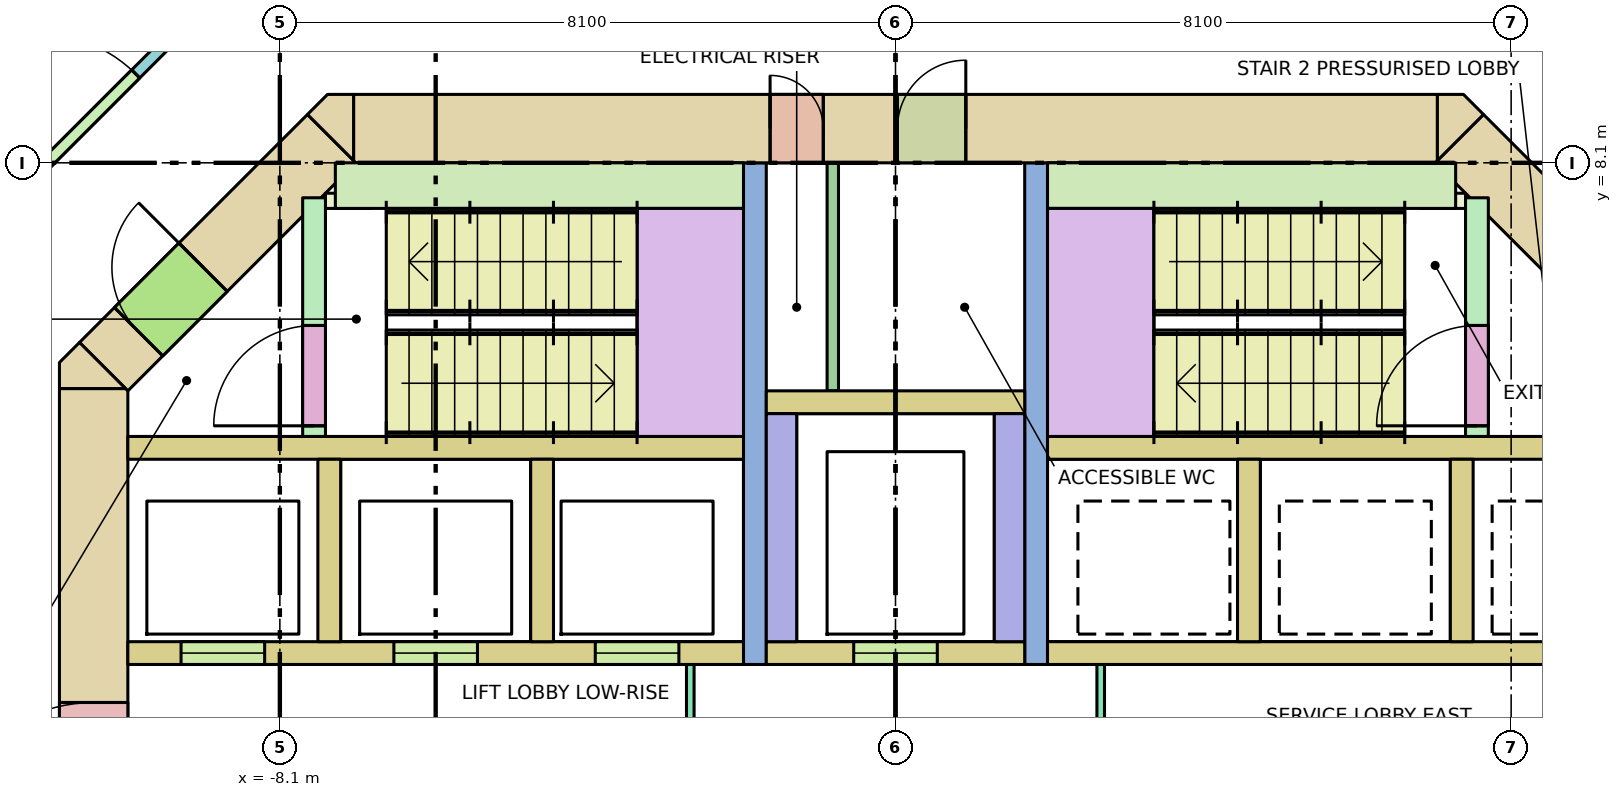
"""IFC4 building model, lengths in metres.
Left out: names, types, materials, properties, quantities, classifications, styles, units other than length and angle.
Written with IfcOpenShell. Run it as: python <this file> out.ifc"""

import sys

from ifc_helpers import new_model, si_unit, direction, frame, frame_2d, origin, place, context, subcontext, project, spatial, polyline, rectangle, outline, extrude, element, fill, save


model = new_model("IFC4")
c1 = context("Model", 3, precision=1e-05, world=origin(), true_north=direction((0.0, 1.0)))
c2 = subcontext(c1, "Body", "Model", "MODEL_VIEW")
j1 = project(units=[si_unit("LENGTHUNIT", "METRE"), si_unit("PLANEANGLEUNIT", "RADIAN")], contexts=[c1])
p1 = place(None, origin())
s1 = spatial("IfcSite", under=j1, at=p1, CompositionType="ELEMENT")
p2 = place(p1, origin())
s2 = spatial("IfcBuilding", under=s1, at=p2, CompositionType="ELEMENT")
p3 = place(p2, frame((0.0, 0.0, 98.6)))
s3 = spatial("IfcBuildingStorey", under=s2, at=p3, CompositionType="ELEMENT", Elevation=98.6)
p4 = place(p3, frame((-7.13, 8.55, -0.28), z_axis=(0.0, 0.0, 1.0), x_axis=(1.0, 0.0, 0.0)))
e1 = element("IfcWall", 1, at=p4, inside=s3, PredefinedType="SHEAR", context=c2, shape_type="SweptSolid", body=[
    extrude(rectangle(XDim=14.26, YDim=0.9, at=frame_2d((7.13, 0.0))), origin(), (0.0, 0.0, 1.0), 4.0),
])
p5 = place(p4, frame((5.48, 0.0, 0.28)))
e2 = element("IfcOpeningElement", 2, at=p5, cuts=e1, PredefinedType="OPENING", context=c2, shape_type="SweptSolid", body=[
    extrude(rectangle(XDim=0.7, YDim=2.1, at=frame_2d((0.35, 1.05))), frame((0.0, 0.46, 0.0), z_axis=(0.0, -1.0, 0.0), x_axis=(1.0, 0.0, 0.0)), (0.0, 0.0, 1.0), 0.92),
])
p6 = place(p4, frame((7.155, 0.0, 0.28)))
e3 = element("IfcOpeningElement", 3, at=p6, cuts=e1, PredefinedType="OPENING", context=c2, shape_type="SweptSolid", body=[
    extrude(rectangle(XDim=0.9, YDim=2.1, at=frame_2d((0.45, 1.05))), frame((0.0, 0.46, 0.0), z_axis=(0.0, -1.0, 0.0), x_axis=(1.0, 0.0, 0.0)), (0.0, 0.0, 1.0), 0.92),
])
p7 = place(p3, frame((-10.55, -5.13, -0.28), z_axis=(0.0, 0.0, 1.0), x_axis=(0.0, 1.0, 0.0)))
e4 = element("IfcWall", 4, at=p7, inside=s3, PredefinedType="SHEAR", context=c2, shape_type="SweptSolid", body=[
    extrude(rectangle(XDim=10.26, YDim=0.9, at=frame_2d((5.13, 0.0))), origin(), (0.0, 0.0, 1.0), 4.0),
])
p8 = place(p7, frame((4.13, 0.0, 0.28)))
e5 = element("IfcOpeningElement", 5, at=p8, cuts=e4, PredefinedType="OPENING", context=c2, shape_type="SweptSolid", body=[
    extrude(rectangle(XDim=2.0, YDim=2.1, at=frame_2d((1.0, 1.05))), frame((0.0, 0.46, 0.0), z_axis=(0.0, -1.0, 0.0), x_axis=(1.0, 0.0, 0.0)), (0.0, 0.0, 1.0), 0.92),
])
p9 = place(p3, frame((-10.418, 5.418, -0.28), z_axis=(0.0, 0.0, 1.0), x_axis=(0.707106781187, 0.707106781187, 0.0)))
e6 = element("IfcWall", 6, at=p9, inside=s3, PredefinedType="SHEAR", context=c2, shape_type="SweptSolid", body=[
    extrude(rectangle(XDim=4.243, YDim=0.9, at=frame_2d((2.121, 0.0))), origin(), (0.0, 0.0, 1.0), 4.0),
])
p10 = place(p9, frame((0.65, 0.0, 0.28)))
e7 = element("IfcOpeningElement", 7, at=p10, cuts=e6, PredefinedType="OPENING", context=c2, shape_type="SweptSolid", body=[
    extrude(rectangle(XDim=1.2, YDim=2.1, at=frame_2d((0.6, 1.05))), frame((0.0, 0.46, 0.0), z_axis=(0.0, -1.0, 0.0), x_axis=(1.0, 0.0, 0.0)), (0.0, 0.0, 1.0), 0.92),
])
p11 = place(p3, frame((7.418, 8.418, -0.28), z_axis=(0.0, 0.0, 1.0), x_axis=(0.707106781187, -0.707106781187, 0.0)))
e8 = element("IfcWall", 8, at=p11, inside=s3, PredefinedType="SHEAR", context=c2, shape_type="SweptSolid", body=[
    extrude(rectangle(XDim=4.243, YDim=0.9, at=frame_2d((2.121, 0.0))), origin(), (0.0, 0.0, 1.0), 4.0),
])
p12 = place(p11, frame((2.393, 0.0, 0.28)))
e9 = element("IfcOpeningElement", 9, at=p12, cuts=e8, PredefinedType="OPENING", context=c2, shape_type="SweptSolid", body=[
    extrude(rectangle(XDim=1.2, YDim=2.1, at=frame_2d((0.6, 1.05))), frame((0.0, 0.46, 0.0), z_axis=(0.0, -1.0, 0.0), x_axis=(1.0, 0.0, 0.0)), (0.0, 0.0, 1.0), 0.92),
])
p13 = place(p3, frame((0.0, 0.0, -0.28)))
e10 = element("IfcWall", 10, at=p13, inside=s3, PredefinedType="SHEAR", context=c2, shape_type="SweptSolid", body=[
    extrude(outline(polyline([(-10.736, 5.736), (-10.13, 5.13), (-11.0, 5.13), (-11.0, 5.473), (-10.736, 5.736)])), origin(), (0.0, 0.0, 1.0), 4.0),
])
p14 = place(p3, frame((0.0, 0.0, -0.28)))
e11 = element("IfcWall", 11, at=p14, inside=s3, PredefinedType="SHEAR", context=c2, shape_type="SweptSolid", body=[
    extrude(outline(polyline([(-7.473, 9.0), (-7.13, 9.0), (-7.13, 8.13), (-7.736, 8.736), (-7.473, 9.0)])), origin(), (0.0, 0.0, 1.0), 4.0),
])
p15 = place(p3, frame((0.0, 0.0, -0.28)))
e12 = element("IfcWall", 12, at=p15, inside=s3, PredefinedType="SHEAR", context=c2, shape_type="SweptSolid", body=[
    extrude(outline(polyline([(7.473, 9.0), (7.736, 8.736), (7.13, 8.13), (7.13, 9.0), (7.473, 9.0)])), origin(), (0.0, 0.0, 1.0), 4.0),
])
for number, where, z_axis, x_axis in (
    (13, (-10.1, 4.35, 0.0), (0.0, 0.0, 1.0), (1.0, 0.0, 0.0)),
    (14, (2.0, 4.35, 0.0), (0.0, 0.0, 1.0), (1.0, 0.0, 0.0)),
):
    element("IfcWall", number, at=place(p3, frame(where, z_axis=z_axis, x_axis=x_axis)), inside=s3, PredefinedType="SOLIDWALL", context=c2, shape_type="SweptSolid", body=[
        extrude(rectangle(XDim=8.1, YDim=0.3, at=frame_2d((4.05, 0.0))), origin(), (0.0, 0.0, 1.0), 3.72),
    ])
p16 = place(p3, frame((-10.1, 1.65, 0.0), z_axis=(0.0, 0.0, 1.0), x_axis=(1.0, 0.0, 0.0)))
e15 = element("IfcWall", 15, at=p16, inside=s3, PredefinedType="SOLIDWALL", context=c2, shape_type="SweptSolid", body=[
    extrude(rectangle(XDim=8.1, YDim=0.3, at=frame_2d((4.05, 0.0))), origin(), (0.0, 0.0, 1.0), 3.72),
])
p17 = place(p16, frame((0.7, 0.0, 0.0)))
e16 = element("IfcOpeningElement", 16, at=p17, cuts=e15, PredefinedType="OPENING", context=c2, shape_type="SweptSolid", body=[
    extrude(rectangle(XDim=1.1, YDim=2.1, at=frame_2d((0.55, 1.05))), frame((0.0, 0.16, 0.0), z_axis=(0.0, -1.0, 0.0), x_axis=(1.0, 0.0, 0.0)), (0.0, 0.0, 1.0), 0.32),
])
p18 = place(p16, frame((3.5, 0.0, 0.0)))
e17 = element("IfcOpeningElement", 17, at=p18, cuts=e15, PredefinedType="OPENING", context=c2, shape_type="SweptSolid", body=[
    extrude(rectangle(XDim=1.1, YDim=2.1, at=frame_2d((0.55, 1.05))), frame((0.0, 0.16, 0.0), z_axis=(0.0, -1.0, 0.0), x_axis=(1.0, 0.0, 0.0)), (0.0, 0.0, 1.0), 0.32),
])
p19 = place(p16, frame((6.15, 0.0, 0.0)))
e18 = element("IfcOpeningElement", 18, at=p19, cuts=e15, PredefinedType="OPENING", context=c2, shape_type="SweptSolid", body=[
    extrude(rectangle(XDim=1.1, YDim=2.1, at=frame_2d((0.55, 1.05))), frame((0.0, 0.16, 0.0), z_axis=(0.0, -1.0, 0.0), x_axis=(1.0, 0.0, 0.0)), (0.0, 0.0, 1.0), 0.32),
])
p20 = place(p3, frame((2.0, 1.65, 0.0), z_axis=(0.0, 0.0, 1.0), x_axis=(1.0, 0.0, 0.0)))
e19 = element("IfcWall", 19, at=p20, inside=s3, PredefinedType="SOLIDWALL", context=c2, shape_type="SweptSolid", body=[
    extrude(rectangle(XDim=8.1, YDim=0.3, at=frame_2d((4.05, 0.0))), origin(), (0.0, 0.0, 1.0), 3.72),
])
for number, where, z_axis, x_axis in (
    (20, (-7.45, 1.8, 0.0), (0.0, 0.0, 1.0), (0.0, 1.0, 0.0)),
    (21, (-4.65, 1.8, 0.0), (0.0, 0.0, 1.0), (0.0, 1.0, 0.0)),
    (22, (4.65, 1.8, 0.0), (0.0, 0.0, 1.0), (0.0, 1.0, 0.0)),
    (23, (7.45, 1.8, 0.0), (0.0, 0.0, 1.0), (0.0, 1.0, 0.0)),
):
    element("IfcWall", number, at=place(p3, frame(where, z_axis=z_axis, x_axis=x_axis)), inside=s3, PredefinedType="SOLIDWALL", context=c2, shape_type="SweptSolid", body=[
        extrude(rectangle(XDim=2.4, YDim=0.3, at=frame_2d((1.2, 0.0))), origin(), (0.0, 0.0, 1.0), 3.72),
    ])
for number, where, z_axis, x_axis in (
    (24, (-1.85, 1.5, 0.0), (0.0, 0.0, 1.0), (0.0, 1.0, 0.0)),
    (25, (1.85, 1.5, 0.0), (0.0, 0.0, 1.0), (0.0, 1.0, 0.0)),
):
    element("IfcWall", number, at=place(p3, frame(where, z_axis=z_axis, x_axis=x_axis)), inside=s3, PredefinedType="SHEAR", context=c2, shape_type="SweptSolid", body=[
        extrude(rectangle(XDim=6.6, YDim=0.3, at=frame_2d((3.3, 0.0))), origin(), (0.0, 0.0, 1.0), 3.72),
    ])
p21 = place(p3, frame((-1.7, 1.65, 0.0), z_axis=(0.0, 0.0, 1.0), x_axis=(1.0, 0.0, 0.0)))
e26 = element("IfcWall", 26, at=p21, inside=s3, PredefinedType="SOLIDWALL", context=c2, shape_type="SweptSolid", body=[
    extrude(rectangle(XDim=3.4, YDim=0.3, at=frame_2d((1.7, 0.0))), origin(), (0.0, 0.0, 1.0), 3.72),
])
p22 = place(p21, frame((1.15, 0.0, 0.0)))
e27 = element("IfcOpeningElement", 27, at=p22, cuts=e26, PredefinedType="OPENING", context=c2, shape_type="SweptSolid", body=[
    extrude(rectangle(XDim=1.1, YDim=2.1, at=frame_2d((0.55, 1.05))), frame((0.0, 0.16, 0.0), z_axis=(0.0, -1.0, 0.0), x_axis=(1.0, 0.0, 0.0)), (0.0, 0.0, 1.0), 0.32),
])
for number, where, z_axis, x_axis in (
    (28, (-1.5, 1.8, 0.0), (0.0, 0.0, 1.0), (0.0, 1.0, 0.0)),
    (29, (1.5, 1.8, 0.0), (0.0, 0.0, 1.0), (0.0, 1.0, 0.0)),
):
    element("IfcWall", number, at=place(p3, frame(where, z_axis=z_axis, x_axis=x_axis)), inside=s3, PredefinedType="SOLIDWALL", context=c2, shape_type="SweptSolid", body=[
        extrude(rectangle(XDim=3.0, YDim=0.4, at=frame_2d((1.5, 0.0))), origin(), (0.0, 0.0, 1.0), 3.72),
    ])
p23 = place(p3, frame((-1.7, 4.95, 0.0), z_axis=(0.0, 0.0, 1.0), x_axis=(1.0, 0.0, 0.0)))
e30 = element("IfcWall", 30, at=p23, inside=s3, PredefinedType="SOLIDWALL", context=c2, shape_type="SweptSolid", body=[
    extrude(rectangle(XDim=3.4, YDim=0.3, at=frame_2d((1.7, 0.0))), origin(), (0.0, 0.0, 1.0), 3.72),
])
p24 = place(p3, frame((-7.65, 4.5, 0.0), z_axis=(0.0, 0.0, 1.0), x_axis=(0.0, 1.0, 0.0)))
e31 = element("IfcWall", 31, at=p24, inside=s3, PredefinedType="SHEAR", context=c2, shape_type="SweptSolid", body=[
    extrude(rectangle(XDim=3.14, YDim=0.3, at=frame_2d((1.57, 0.0))), origin(), (0.0, 0.0, 1.0), 3.72),
])
p25 = place(p24, frame((0.14, 0.0, 0.0)))
e32 = element("IfcOpeningElement", 32, at=p25, cuts=e31, PredefinedType="OPENING", context=c2, shape_type="SweptSolid", body=[
    extrude(rectangle(XDim=1.32, YDim=2.1, at=frame_2d((0.66, 1.05))), frame((0.0, 0.16, 0.0), z_axis=(0.0, -1.0, 0.0), x_axis=(1.0, 0.0, 0.0)), (0.0, 0.0, 1.0), 0.32),
])
p26 = place(p3, frame((-7.37, 7.8, 0.0), z_axis=(0.0, 0.0, 1.0), x_axis=(1.0, 0.0, 0.0)))
e33 = element("IfcWall", 33, at=p26, inside=s3, PredefinedType="SHEAR", context=c2, shape_type="SweptSolid", body=[
    extrude(rectangle(XDim=5.37, YDim=0.6, at=frame_2d((2.685, 0.0))), origin(), (0.0, 0.0, 1.0), 3.72),
])
p27 = place(p3, frame((7.65, 4.5, 0.0), z_axis=(0.0, 0.0, 1.0), x_axis=(0.0, 1.0, 0.0)))
e34 = element("IfcWall", 34, at=p27, inside=s3, PredefinedType="SHEAR", context=c2, shape_type="SweptSolid", body=[
    extrude(rectangle(XDim=3.14, YDim=0.3, at=frame_2d((1.57, 0.0))), origin(), (0.0, 0.0, 1.0), 3.72),
])
p28 = place(p27, frame((0.14, 0.0, 0.0)))
e35 = element("IfcOpeningElement", 35, at=p28, cuts=e34, PredefinedType="OPENING", context=c2, shape_type="SweptSolid", body=[
    extrude(rectangle(XDim=1.32, YDim=2.1, at=frame_2d((0.66, 1.05))), frame((0.0, 0.16, 0.0), z_axis=(0.0, -1.0, 0.0), x_axis=(1.0, 0.0, 0.0)), (0.0, 0.0, 1.0), 0.32),
])
p29 = place(p3, frame((2.0, 7.8, 0.0), z_axis=(0.0, 0.0, 1.0), x_axis=(1.0, 0.0, 0.0)))
e36 = element("IfcWall", 36, at=p29, inside=s3, PredefinedType="SHEAR", context=c2, shape_type="SweptSolid", body=[
    extrude(rectangle(XDim=5.37, YDim=0.6, at=frame_2d((2.685, 0.0))), origin(), (0.0, 0.0, 1.0), 3.72),
])
for number, where, z_axis, x_axis in (
    (37, (-7.5, 7.6, 0.0), (0.0, 0.0, 1.0), (1.0, 0.0, 0.0)),
    (38, (6.9, 7.6, 0.0), (0.0, 0.0, 1.0), (1.0, 0.0, 0.0)),
):
    element("IfcWall", number, at=place(p3, frame(where, z_axis=z_axis, x_axis=x_axis)), inside=s3, PredefinedType="SHEAR", context=c2, shape_type="SweptSolid", body=[
        extrude(rectangle(XDim=0.6, YDim=0.2, at=frame_2d((0.3, 0.0))), origin(), (0.0, 0.0, 1.0), 3.72),
    ])
p30 = place(p3, frame((-2.7, -1.5, 0.0), z_axis=(0.0, 0.0, 1.0), x_axis=(0.0, 1.0, 0.0)))
e39 = element("IfcWall", 39, at=p30, inside=s3, PredefinedType="PARTITIONING", context=c2, shape_type="SweptSolid", body=[
    extrude(rectangle(XDim=3.0, YDim=0.1, at=frame_2d((1.5, 0.0))), origin(), (0.0, 0.0, 1.0), 3.72),
])
p31 = place(p30, frame((0.9, 0.0, 0.0)))
e40 = element("IfcOpeningElement", 40, at=p31, cuts=e39, PredefinedType="OPENING", context=c2, shape_type="SweptSolid", body=[
    extrude(rectangle(XDim=1.2, YDim=2.1, at=frame_2d((0.6, 1.05))), frame((0.0, 0.06, 0.0), z_axis=(0.0, -1.0, 0.0), x_axis=(1.0, 0.0, 0.0)), (0.0, 0.0, 1.0), 0.12),
])
p32 = place(p3, frame((2.7, -1.5, 0.0), z_axis=(0.0, 0.0, 1.0), x_axis=(0.0, 1.0, 0.0)))
e41 = element("IfcWall", 41, at=p32, inside=s3, PredefinedType="PARTITIONING", context=c2, shape_type="SweptSolid", body=[
    extrude(rectangle(XDim=3.0, YDim=0.1, at=frame_2d((1.5, 0.0))), origin(), (0.0, 0.0, 1.0), 3.72),
])
p33 = place(p32, frame((0.9, 0.0, 0.0)))
e42 = element("IfcOpeningElement", 42, at=p33, cuts=e41, PredefinedType="OPENING", context=c2, shape_type="SweptSolid", body=[
    extrude(rectangle(XDim=1.2, YDim=2.1, at=frame_2d((0.6, 1.05))), frame((0.0, 0.06, 0.0), z_axis=(0.0, -1.0, 0.0), x_axis=(1.0, 0.0, 0.0)), (0.0, 0.0, 1.0), 0.12),
])
p34 = place(p3, frame((-0.825, 5.1, 0.0), z_axis=(0.0, 0.0, 1.0), x_axis=(0.0, 1.0, 0.0)))
e43 = element("IfcWall", 43, at=p34, inside=s3, PredefinedType="PARTITIONING", context=c2, shape_type="SweptSolid", body=[
    extrude(rectangle(XDim=3.0, YDim=0.15, at=frame_2d((1.5, 0.0))), origin(), (0.0, 0.0, 1.0), 3.72),
])
p35 = place(p3, frame((-12.975, 6.291, 0.0), z_axis=(0.0, 0.0, 1.0), x_axis=(0.707106781187, 0.707106781187, 0.0)))
e44 = element("IfcWall", 44, at=p35, inside=s3, PredefinedType="PARTITIONING", context=c2, shape_type="SweptSolid", body=[
    extrude(rectangle(XDim=6.624, YDim=0.15, at=frame_2d((3.312, 0.0))), origin(), (0.0, 0.0, 1.0), 2.82),
])
p36 = place(p35, frame((2.412, 0.0, 0.0)))
e45 = element("IfcOpeningElement", 45, at=p36, cuts=e44, PredefinedType="OPENING", context=c2, shape_type="SweptSolid", body=[
    extrude(rectangle(XDim=1.8, YDim=2.1, at=frame_2d((0.9, 1.05))), frame((0.0, 0.085, 0.0), z_axis=(0.0, -1.0, 0.0), x_axis=(1.0, 0.0, 0.0)), (0.0, 0.0, 1.0), 0.17),
])
p37 = place(p3, frame((8.291, 10.975, 0.0), z_axis=(0.0, 0.0, 1.0), x_axis=(0.707106781187, -0.707106781187, 0.0)))
e46 = element("IfcWall", 46, at=p37, inside=s3, PredefinedType="PARTITIONING", context=c2, shape_type="SweptSolid", body=[
    extrude(rectangle(XDim=6.624, YDim=0.15, at=frame_2d((3.312, 0.0))), origin(), (0.0, 0.0, 1.0), 2.82),
])
p38 = place(p37, frame((3.274, 0.0, 0.0)))
e47 = element("IfcOpeningElement", 47, at=p38, cuts=e46, PredefinedType="OPENING", context=c2, shape_type="SweptSolid", body=[
    extrude(rectangle(XDim=0.9, YDim=2.1, at=frame_2d((0.45, 1.05))), frame((0.0, 0.085, 0.0), z_axis=(0.0, -1.0, 0.0), x_axis=(1.0, 0.0, 0.0)), (0.0, 0.0, 1.0), 0.17),
])
p39 = place(p37, frame((0.524, 0.0, 0.0)))
e48 = element("IfcOpeningElement", 48, at=p39, cuts=e46, PredefinedType="OPENING", context=c2, shape_type="SweptSolid", body=[
    extrude(rectangle(XDim=0.9, YDim=2.1, at=frame_2d((0.45, 1.05))), frame((0.0, 0.085, 0.0), z_axis=(0.0, -1.0, 0.0), x_axis=(1.0, 0.0, 0.0)), (0.0, 0.0, 1.0), 0.17),
])
p40 = place(p17, origin())
e49 = element("IfcDoor", 49, at=p40, inside=s3, OperationType="DOUBLE_DOOR_SLIDING", PredefinedType="DOOR", context=c2, shape_type="SweptSolid", body=[
    extrude(rectangle(XDim=1.1, YDim=2.1, at=frame_2d((0.55, 1.05))), frame((0.0, 0.025, 0.0), z_axis=(0.0, -1.0, 0.0), x_axis=(1.0, 0.0, 0.0)), (0.0, 0.0, 1.0), 0.05),
])
fill(e16, e49)
p41 = place(p18, origin())
e50 = element("IfcDoor", 50, at=p41, inside=s3, OperationType="DOUBLE_DOOR_SLIDING", PredefinedType="DOOR", context=c2, shape_type="SweptSolid", body=[
    extrude(rectangle(XDim=1.1, YDim=2.1, at=frame_2d((0.55, 1.05))), frame((0.0, 0.025, 0.0), z_axis=(0.0, -1.0, 0.0), x_axis=(1.0, 0.0, 0.0)), (0.0, 0.0, 1.0), 0.05),
])
fill(e17, e50)
p42 = place(p19, origin())
e51 = element("IfcDoor", 51, at=p42, inside=s3, OperationType="DOUBLE_DOOR_SLIDING", PredefinedType="DOOR", context=c2, shape_type="SweptSolid", body=[
    extrude(rectangle(XDim=1.1, YDim=2.1, at=frame_2d((0.55, 1.05))), frame((0.0, 0.025, 0.0), z_axis=(0.0, -1.0, 0.0), x_axis=(1.0, 0.0, 0.0)), (0.0, 0.0, 1.0), 0.05),
])
fill(e18, e51)
p43 = place(p22, origin())
e52 = element("IfcDoor", 52, at=p43, inside=s3, OperationType="DOUBLE_DOOR_SLIDING", PredefinedType="DOOR", context=c2, shape_type="SweptSolid", body=[
    extrude(rectangle(XDim=1.1, YDim=2.1, at=frame_2d((0.55, 1.05))), frame((0.0, 0.025, 0.0), z_axis=(0.0, -1.0, 0.0), x_axis=(1.0, 0.0, 0.0)), (0.0, 0.0, 1.0), 0.05),
])
fill(e27, e52)
p44 = place(p25, origin())
e53 = element("IfcDoor", 53, at=p44, inside=s3, OperationType="DOUBLE_DOOR_SINGLE_SWING", PredefinedType="DOOR", context=c2, shape_type="SweptSolid", body=[
    extrude(rectangle(XDim=1.32, YDim=2.1, at=frame_2d((0.66, 1.05))), frame((0.0, 0.025, 0.0), z_axis=(0.0, -1.0, 0.0), x_axis=(1.0, 0.0, 0.0)), (0.0, 0.0, 1.0), 0.05),
])
fill(e32, e53)
p45 = place(p10, origin())
e54 = element("IfcDoor", 54, at=p45, inside=s3, OperationType="SINGLE_SWING_RIGHT", PredefinedType="DOOR", context=c2, shape_type="SweptSolid", body=[
    extrude(rectangle(XDim=1.2, YDim=2.1, at=frame_2d((0.6, 1.05))), frame((0.0, 0.025, 0.0), z_axis=(0.0, -1.0, 0.0), x_axis=(1.0, 0.0, 0.0)), (0.0, 0.0, 1.0), 0.05),
])
fill(e7, e54)
p46 = place(p28, origin())
e55 = element("IfcDoor", 55, at=p46, inside=s3, OperationType="DOUBLE_DOOR_SINGLE_SWING", PredefinedType="DOOR", context=c2, shape_type="SweptSolid", body=[
    extrude(rectangle(XDim=1.32, YDim=2.1, at=frame_2d((0.66, 1.05))), frame((0.0, 0.025, 0.0), z_axis=(0.0, -1.0, 0.0), x_axis=(1.0, 0.0, 0.0)), (0.0, 0.0, 1.0), 0.05),
])
fill(e35, e55)
p47 = place(p8, origin())
e56 = element("IfcDoor", 56, at=p47, inside=s3, OperationType="DOUBLE_DOOR_SINGLE_SWING", PredefinedType="DOOR", context=c2, shape_type="SweptSolid", body=[
    extrude(rectangle(XDim=2.0, YDim=2.1, at=frame_2d((1.0, 1.05))), frame((0.0, 0.025, 0.0), z_axis=(0.0, -1.0, 0.0), x_axis=(1.0, 0.0, 0.0)), (0.0, 0.0, 1.0), 0.05),
])
fill(e5, e56)
p48 = place(p5, origin())
e57 = element("IfcDoor", 57, at=p48, inside=s3, OperationType="SINGLE_SWING_LEFT", PredefinedType="DOOR", context=c2, shape_type="SweptSolid", body=[
    extrude(rectangle(XDim=0.7, YDim=2.1, at=frame_2d((0.35, 1.05))), frame((0.0, 0.025, 0.0), z_axis=(0.0, -1.0, 0.0), x_axis=(1.0, 0.0, 0.0)), (0.0, 0.0, 1.0), 0.05),
])
fill(e2, e57)
p49 = place(p6, origin())
e58 = element("IfcDoor", 58, at=p49, inside=s3, OperationType="SINGLE_SWING_RIGHT", PredefinedType="DOOR", context=c2, shape_type="SweptSolid", body=[
    extrude(rectangle(XDim=0.9, YDim=2.1, at=frame_2d((0.45, 1.05))), frame((0.0, 0.025, 0.0), z_axis=(0.0, -1.0, 0.0), x_axis=(1.0, 0.0, 0.0)), (0.0, 0.0, 1.0), 0.05),
])
fill(e3, e58)
p50 = place(p36, origin())
e59 = element("IfcDoor", 59, at=p50, inside=s3, OperationType="DOUBLE_DOOR_SINGLE_SWING", PredefinedType="DOOR", context=c2, shape_type="SweptSolid", body=[
    extrude(rectangle(XDim=1.8, YDim=2.1, at=frame_2d((0.9, 1.05))), frame((0.0, 0.025, 0.0), z_axis=(0.0, -1.0, 0.0), x_axis=(1.0, 0.0, 0.0)), (0.0, 0.0, 1.0), 0.05),
])
fill(e45, e59)
save(model, sys.argv[1])
